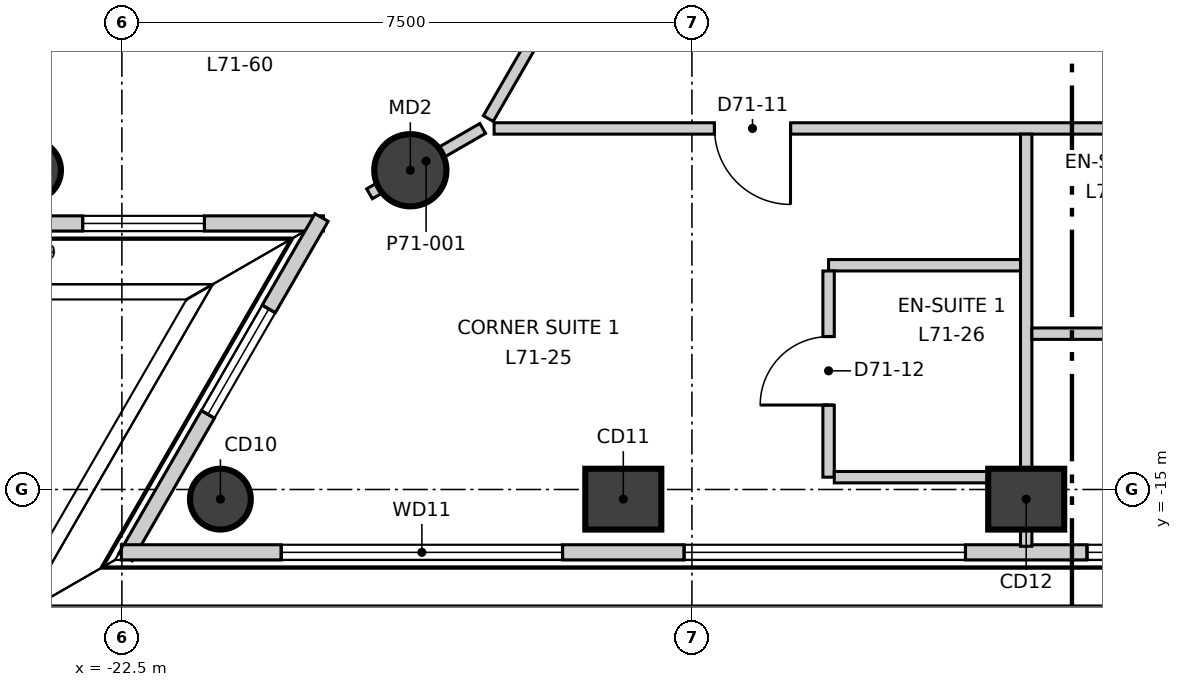
"""IFC4 building model, lengths in metres.
Left out: names, types, materials, properties, quantities, classifications, styles, units other than length and angle.
Written with IfcOpenShell. Run it as: python <this file> out.ifc"""

import sys

from ifc_helpers import new_model, si_unit, direction, frame, frame_2d, origin, origin_2d, place, context, subcontext, project, spatial, rectangle, circle, extrude, element, fill, save


model = new_model("IFC4")
c1 = context("Model", 3, precision=1e-05, world=origin(), true_north=direction((0.0, 1.0)))
c2 = subcontext(c1, "Body", "Model", "MODEL_VIEW")
j1 = project(units=[si_unit("LENGTHUNIT", "METRE"), si_unit("PLANEANGLEUNIT", "RADIAN")], contexts=[c1])
p1 = place(None, origin())
s1 = spatial("IfcSite", under=j1, at=p1, CompositionType="ELEMENT")
p2 = place(p1, origin())
s2 = spatial("IfcBuilding", under=s1, at=p2, CompositionType="ELEMENT")
p3 = place(p2, frame((0.0, 0.0, 300.7)))
s3 = spatial("IfcBuildingStorey", under=s2, at=p3, CompositionType="ELEMENT", Elevation=300.7)
for number, where, z_axis, x_axis in (
    (1, (-23.702, -10.8, -0.3), (0.0, 0.0, 1.0), (0.5, 0.866, 0.0)),
    (2, (-21.204, -15.127, -0.3), (0.0, 0.0, 1.0), (1.0, 0.0, 0.0)),
):
    element("IfcColumn", number, at=place(p3, frame(where, z_axis=z_axis, x_axis=x_axis)), inside=s3, PredefinedType="COLUMN", context=c2, shape_type="SweptSolid", body=[
        extrude(circle(Radius=0.4, at=origin_2d()), origin(), (0.0, 0.0, 1.0), 3.6),
    ])
for number, where, z_axis, x_axis in (
    (3, (-15.903, -15.127, -0.3), (0.0, 0.0, 1.0), (1.0, 0.0, 0.0)),
    (4, (-10.602, -15.127, -0.3), (0.0, 0.0, 1.0), (1.0, 0.0, 0.0)),
):
    element("IfcColumn", number, at=place(p3, frame(where, z_axis=z_axis, x_axis=x_axis)), inside=s3, PredefinedType="COLUMN", context=c2, shape_type="SweptSolid", body=[
        extrude(rectangle(XDim=1.0, YDim=0.8, at=origin_2d()), origin(), (0.0, 0.0, 1.0), 3.6),
    ])
p4 = place(p3, frame((-18.705, -10.8, -0.3), z_axis=(0.0, 0.0, 1.0), x_axis=(1.0, 0.0, 0.0)))
e5 = element("IfcColumn", 5, at=p4, inside=s3, PredefinedType="COLUMN", context=c2, shape_type="SweptSolid", body=[
    extrude(circle(Radius=0.475, at=origin_2d()), origin(), (0.0, 0.0, 1.0), 3.6),
])
p5 = place(p3, frame((-2.453, 27.405, 0.0), z_axis=(0.0, 0.0, 1.0), x_axis=(-0.500000041859, -0.866025379617, 0.0)))
e6 = element("IfcWall", 6, at=p5, inside=s3, PredefinedType="ELEMENTEDWALL", context=c2, shape_type="SweptSolid", body=[
    extrude(rectangle(XDim=44.994, YDim=0.2, at=frame_2d((22.497, 0.0))), origin(), (0.0, 0.0, 1.0), 3.3),
])
p6 = place(p5, frame((2.103, 0.0, 0.9)))
e7 = element("IfcOpeningElement", 7, at=p6, cuts=e6, PredefinedType="OPENING", context=c2, shape_type="SweptSolid", body=[
    extrude(rectangle(XDim=3.7, YDim=2.2, at=frame_2d((1.85, 1.1))), frame((0.0, 0.11, 0.0), z_axis=(0.0, -1.0, 0.0), x_axis=(1.0, 0.0, 0.0)), (0.0, 0.0, 1.0), 0.22),
])
p7 = place(p5, frame((7.404, 0.0, 0.9)))
e8 = element("IfcOpeningElement", 8, at=p7, cuts=e6, PredefinedType="OPENING", context=c2, shape_type="SweptSolid", body=[
    extrude(rectangle(XDim=3.7, YDim=2.2, at=frame_2d((1.85, 1.1))), frame((0.0, 0.11, 0.0), z_axis=(0.0, -1.0, 0.0), x_axis=(1.0, 0.0, 0.0)), (0.0, 0.0, 1.0), 0.22),
])
p8 = place(p5, frame((12.705, 0.0, 0.9)))
e9 = element("IfcOpeningElement", 9, at=p8, cuts=e6, PredefinedType="OPENING", context=c2, shape_type="SweptSolid", body=[
    extrude(rectangle(XDim=3.7, YDim=2.2, at=frame_2d((1.85, 1.1))), frame((0.0, 0.11, 0.0), z_axis=(0.0, -1.0, 0.0), x_axis=(1.0, 0.0, 0.0)), (0.0, 0.0, 1.0), 0.22),
])
p9 = place(p5, frame((18.006, 0.0, 0.9)))
e10 = element("IfcOpeningElement", 10, at=p9, cuts=e6, PredefinedType="OPENING", context=c2, shape_type="SweptSolid", body=[
    extrude(rectangle(XDim=3.7, YDim=2.2, at=frame_2d((1.85, 1.1))), frame((0.0, 0.11, 0.0), z_axis=(0.0, -1.0, 0.0), x_axis=(1.0, 0.0, 0.0)), (0.0, 0.0, 1.0), 0.22),
])
p10 = place(p5, frame((23.307, 0.0, 0.9)))
e11 = element("IfcOpeningElement", 11, at=p10, cuts=e6, PredefinedType="OPENING", context=c2, shape_type="SweptSolid", body=[
    extrude(rectangle(XDim=3.7, YDim=2.2, at=frame_2d((1.85, 1.1))), frame((0.0, 0.11, 0.0), z_axis=(0.0, -1.0, 0.0), x_axis=(1.0, 0.0, 0.0)), (0.0, 0.0, 1.0), 0.22),
])
p11 = place(p5, frame((28.608, 0.0, 0.9)))
e12 = element("IfcOpeningElement", 12, at=p11, cuts=e6, PredefinedType="OPENING", context=c2, shape_type="SweptSolid", body=[
    extrude(rectangle(XDim=3.7, YDim=2.2, at=frame_2d((1.85, 1.1))), frame((0.0, 0.11, 0.0), z_axis=(0.0, -1.0, 0.0), x_axis=(1.0, 0.0, 0.0)), (0.0, 0.0, 1.0), 0.22),
])
p12 = place(p5, frame((33.909, 0.0, 0.9)))
e13 = element("IfcOpeningElement", 13, at=p12, cuts=e6, PredefinedType="OPENING", context=c2, shape_type="SweptSolid", body=[
    extrude(rectangle(XDim=3.7, YDim=2.2, at=frame_2d((1.85, 1.1))), frame((0.0, 0.11, 0.0), z_axis=(0.0, -1.0, 0.0), x_axis=(1.0, 0.0, 0.0)), (0.0, 0.0, 1.0), 0.22),
])
p13 = place(p5, frame((39.21, 0.0, 0.9)))
e14 = element("IfcOpeningElement", 14, at=p13, cuts=e6, PredefinedType="OPENING", context=c2, shape_type="SweptSolid", body=[
    extrude(rectangle(XDim=3.7, YDim=2.2, at=frame_2d((1.85, 1.1))), frame((0.0, 0.11, 0.0), z_axis=(0.0, -1.0, 0.0), x_axis=(1.0, 0.0, 0.0)), (0.0, 0.0, 1.0), 0.22),
])
p14 = place(p3, frame((-25.005, -11.5, 0.0), z_axis=(0.0, 0.0, 1.0), x_axis=(1.0, 0.0, 0.0)))
e15 = element("IfcWall", 15, at=p14, inside=s3, PredefinedType="ELEMENTEDWALL", context=c2, shape_type="SweptSolid", body=[
    extrude(rectangle(XDim=5.157, YDim=0.2, at=frame_2d((2.579, 0.0))), origin(), (0.0, 0.0, 1.0), 3.3),
])
p15 = place(p14, frame((1.99, 0.0, 0.9)))
e16 = element("IfcOpeningElement", 16, at=p15, cuts=e15, PredefinedType="OPENING", context=c2, shape_type="SweptSolid", body=[
    extrude(rectangle(XDim=1.6, YDim=2.2, at=frame_2d((0.8, 1.1))), frame((0.0, 0.11, 0.0), z_axis=(0.0, -1.0, 0.0), x_axis=(1.0, 0.0, 0.0)), (0.0, 0.0, 1.0), 0.22),
])
p16 = place(p3, frame((-19.873, -11.422, 0.0), z_axis=(0.0, 0.0, 1.0), x_axis=(-0.500074877135, -0.865982169134, 0.0)))
e17 = element("IfcWall", 17, at=p16, inside=s3, PredefinedType="ELEMENTEDWALL", context=c2, shape_type="SweptSolid", body=[
    extrude(rectangle(XDim=5.157, YDim=0.2, at=frame_2d((2.579, 0.0))), origin(), (0.0, 0.0, 1.0), 3.3),
])
p17 = place(p16, frame((1.39, 0.0, 0.9)))
e18 = element("IfcOpeningElement", 18, at=p17, cuts=e17, PredefinedType="OPENING", context=c2, shape_type="SweptSolid", body=[
    extrude(rectangle(XDim=1.6, YDim=2.2, at=frame_2d((0.8, 1.1))), frame((0.0, 0.11, 0.0), z_axis=(0.0, -1.0, 0.0), x_axis=(1.0, 0.0, 0.0)), (0.0, 0.0, 1.0), 0.22),
])
p18 = place(p3, frame((-22.507, -15.827, 0.0), z_axis=(0.0, 0.0, 1.0), x_axis=(1.0, 0.0, 0.0)))
e19 = element("IfcWall", 19, at=p18, inside=s3, PredefinedType="ELEMENTEDWALL", context=c2, shape_type="SweptSolid", body=[
    extrude(rectangle(XDim=44.994, YDim=0.2, at=frame_2d((22.497, 0.0))), origin(), (0.0, 0.0, 1.0), 3.3),
])
p19 = place(p18, frame((2.104, 0.0, 0.9)))
e20 = element("IfcOpeningElement", 20, at=p19, cuts=e19, PredefinedType="OPENING", context=c2, shape_type="SweptSolid", body=[
    extrude(rectangle(XDim=3.7, YDim=2.2, at=frame_2d((1.85, 1.1))), frame((0.0, 0.11, 0.0), z_axis=(0.0, -1.0, 0.0), x_axis=(1.0, 0.0, 0.0)), (0.0, 0.0, 1.0), 0.22),
])
p20 = place(p18, frame((7.405, 0.0, 0.9)))
e21 = element("IfcOpeningElement", 21, at=p20, cuts=e19, PredefinedType="OPENING", context=c2, shape_type="SweptSolid", body=[
    extrude(rectangle(XDim=3.7, YDim=2.2, at=frame_2d((1.85, 1.1))), frame((0.0, 0.11, 0.0), z_axis=(0.0, -1.0, 0.0), x_axis=(1.0, 0.0, 0.0)), (0.0, 0.0, 1.0), 0.22),
])
p21 = place(p18, frame((12.706, 0.0, 0.9)))
e22 = element("IfcOpeningElement", 22, at=p21, cuts=e19, PredefinedType="OPENING", context=c2, shape_type="SweptSolid", body=[
    extrude(rectangle(XDim=3.7, YDim=2.2, at=frame_2d((1.85, 1.1))), frame((0.0, 0.11, 0.0), z_axis=(0.0, -1.0, 0.0), x_axis=(1.0, 0.0, 0.0)), (0.0, 0.0, 1.0), 0.22),
])
p22 = place(p18, frame((18.006, 0.0, 0.9)))
e23 = element("IfcOpeningElement", 23, at=p22, cuts=e19, PredefinedType="OPENING", context=c2, shape_type="SweptSolid", body=[
    extrude(rectangle(XDim=3.7, YDim=2.2, at=frame_2d((1.85, 1.1))), frame((0.0, 0.11, 0.0), z_axis=(0.0, -1.0, 0.0), x_axis=(1.0, 0.0, 0.0)), (0.0, 0.0, 1.0), 0.22),
])
p23 = place(p18, frame((23.308, 0.0, 0.9)))
e24 = element("IfcOpeningElement", 24, at=p23, cuts=e19, PredefinedType="OPENING", context=c2, shape_type="SweptSolid", body=[
    extrude(rectangle(XDim=3.7, YDim=2.2, at=frame_2d((1.85, 1.1))), frame((0.0, 0.11, 0.0), z_axis=(0.0, -1.0, 0.0), x_axis=(1.0, 0.0, 0.0)), (0.0, 0.0, 1.0), 0.22),
])
p24 = place(p18, frame((28.608, 0.0, 0.9)))
e25 = element("IfcOpeningElement", 25, at=p24, cuts=e19, PredefinedType="OPENING", context=c2, shape_type="SweptSolid", body=[
    extrude(rectangle(XDim=3.7, YDim=2.2, at=frame_2d((1.85, 1.1))), frame((0.0, 0.11, 0.0), z_axis=(0.0, -1.0, 0.0), x_axis=(1.0, 0.0, 0.0)), (0.0, 0.0, 1.0), 0.22),
])
p25 = place(p18, frame((33.91, 0.0, 0.9)))
e26 = element("IfcOpeningElement", 26, at=p25, cuts=e19, PredefinedType="OPENING", context=c2, shape_type="SweptSolid", body=[
    extrude(rectangle(XDim=3.7, YDim=2.2, at=frame_2d((1.85, 1.1))), frame((0.0, 0.11, 0.0), z_axis=(0.0, -1.0, 0.0), x_axis=(1.0, 0.0, 0.0)), (0.0, 0.0, 1.0), 0.22),
])
p26 = place(p18, frame((39.21, 0.0, 0.9)))
e27 = element("IfcOpeningElement", 27, at=p26, cuts=e19, PredefinedType="OPENING", context=c2, shape_type="SweptSolid", body=[
    extrude(rectangle(XDim=3.7, YDim=2.2, at=frame_2d((1.85, 1.1))), frame((0.0, 0.11, 0.0), z_axis=(0.0, -1.0, 0.0), x_axis=(1.0, 0.0, 0.0)), (0.0, 0.0, 1.0), 0.22),
])
p27 = place(p3, frame((-19.242, -11.11, 0.0), z_axis=(0.0, 0.0, 1.0), x_axis=(0.86591836888, 0.500185344083, 0.0)))
e28 = element("IfcWall", 28, at=p27, inside=s3, PredefinedType="PARTITIONING", context=c2, shape_type="SweptSolid", body=[
    extrude(rectangle(XDim=1.719, YDim=0.15, at=frame_2d((0.86, 0.0))), origin(), (0.0, 0.0, 1.0), 2.8),
])
p28 = place(p3, frame((-17.603, -10.25, 0.0), z_axis=(0.0, 0.0, 1.0), x_axis=(1.0, 0.0, 0.0)))
e29 = element("IfcWall", 29, at=p28, inside=s3, PredefinedType="PARTITIONING", context=c2, shape_type="SweptSolid", body=[
    extrude(rectangle(XDim=35.356, YDim=0.15, at=frame_2d((17.678, 0.0))), origin(), (0.0, 0.0, 1.0), 3.3),
])
p29 = place(p28, frame((2.9, 0.0, 0.0)))
e30 = element("IfcOpeningElement", 30, at=p29, cuts=e29, PredefinedType="OPENING", context=c2, shape_type="SweptSolid", body=[
    extrude(rectangle(XDim=1.0, YDim=2.1, at=frame_2d((0.5, 1.05))), frame((0.0, 0.085, 0.0), z_axis=(0.0, -1.0, 0.0), x_axis=(1.0, 0.0, 0.0)), (0.0, 0.0, 1.0), 0.17),
])
p30 = place(p28, frame((10.351, 0.0, 0.0)))
e31 = element("IfcOpeningElement", 31, at=p30, cuts=e29, PredefinedType="OPENING", context=c2, shape_type="SweptSolid", body=[
    extrude(rectangle(XDim=1.0, YDim=2.1, at=frame_2d((0.5, 1.05))), frame((0.0, 0.085, 0.0), z_axis=(0.0, -1.0, 0.0), x_axis=(1.0, 0.0, 0.0)), (0.0, 0.0, 1.0), 0.17),
])
p31 = place(p28, frame((15.652, 0.0, 0.0)))
e32 = element("IfcOpeningElement", 32, at=p31, cuts=e29, PredefinedType="OPENING", context=c2, shape_type="SweptSolid", body=[
    extrude(rectangle(XDim=1.0, YDim=2.1, at=frame_2d((0.5, 1.05))), frame((0.0, 0.085, 0.0), z_axis=(0.0, -1.0, 0.0), x_axis=(1.0, 0.0, 0.0)), (0.0, 0.0, 1.0), 0.17),
])
p32 = place(p28, frame((24.753, 0.0, 0.0)))
e33 = element("IfcOpeningElement", 33, at=p32, cuts=e29, PredefinedType="OPENING", context=c2, shape_type="SweptSolid", body=[
    extrude(rectangle(XDim=1.0, YDim=2.1, at=frame_2d((0.5, 1.05))), frame((0.0, 0.085, 0.0), z_axis=(0.0, -1.0, 0.0), x_axis=(1.0, 0.0, 0.0)), (0.0, 0.0, 1.0), 0.17),
])
p33 = place(p28, frame((31.255, 0.0, 0.0)))
e34 = element("IfcOpeningElement", 34, at=p33, cuts=e29, PredefinedType="OPENING", context=c2, shape_type="SweptSolid", body=[
    extrude(rectangle(XDim=1.0, YDim=2.1, at=frame_2d((0.5, 1.05))), frame((0.0, 0.085, 0.0), z_axis=(0.0, -1.0, 0.0), x_axis=(1.0, 0.0, 0.0)), (0.0, 0.0, 1.0), 0.17),
])
p34 = place(p3, frame((-17.679, -10.12, 0.0), z_axis=(0.0, 0.0, 1.0), x_axis=(0.500008955215, 0.866020233427, 0.0)))
e35 = element("IfcWall", 35, at=p34, inside=s3, PredefinedType="PARTITIONING", context=c2, shape_type="SweptSolid", body=[
    extrude(rectangle(XDim=35.357, YDim=0.15, at=frame_2d((17.679, 0.0))), origin(), (0.0, 0.0, 1.0), 3.3),
])
p35 = place(p34, frame((31.307, 0.0, 0.0)))
e36 = element("IfcOpeningElement", 36, at=p35, cuts=e35, PredefinedType="OPENING", context=c2, shape_type="SweptSolid", body=[
    extrude(rectangle(XDim=1.0, YDim=2.1, at=frame_2d((0.5, 1.05))), frame((0.0, 0.085, 0.0), z_axis=(0.0, -1.0, 0.0), x_axis=(1.0, 0.0, 0.0)), (0.0, 0.0, 1.0), 0.17),
])
p36 = place(p34, frame((20.056, 0.0, 0.0)))
e37 = element("IfcOpeningElement", 37, at=p36, cuts=e35, PredefinedType="OPENING", context=c2, shape_type="SweptSolid", body=[
    extrude(rectangle(XDim=1.0, YDim=2.1, at=frame_2d((0.5, 1.05))), frame((0.0, 0.085, 0.0), z_axis=(0.0, -1.0, 0.0), x_axis=(1.0, 0.0, 0.0)), (0.0, 0.0, 1.0), 0.17),
])
p37 = place(p34, frame((13.253, 0.0, 0.0)))
e38 = element("IfcOpeningElement", 38, at=p37, cuts=e35, PredefinedType="OPENING", context=c2, shape_type="SweptSolid", body=[
    extrude(rectangle(XDim=1.0, YDim=2.1, at=frame_2d((0.5, 1.05))), frame((0.0, 0.085, 0.0), z_axis=(0.0, -1.0, 0.0), x_axis=(1.0, 0.0, 0.0)), (0.0, 0.0, 1.0), 0.17),
])
p38 = place(p34, frame((7.653, 0.0, 0.0)))
e39 = element("IfcOpeningElement", 39, at=p38, cuts=e35, PredefinedType="OPENING", context=c2, shape_type="SweptSolid", body=[
    extrude(rectangle(XDim=1.0, YDim=2.1, at=frame_2d((0.5, 1.05))), frame((0.0, 0.085, 0.0), z_axis=(0.0, -1.0, 0.0), x_axis=(1.0, 0.0, 0.0)), (0.0, 0.0, 1.0), 0.17),
])
p39 = place(p34, frame((2.952, 0.0, 0.0)))
e40 = element("IfcOpeningElement", 40, at=p39, cuts=e35, PredefinedType="OPENING", context=c2, shape_type="SweptSolid", body=[
    extrude(rectangle(XDim=1.0, YDim=2.1, at=frame_2d((0.5, 1.05))), frame((0.0, 0.085, 0.0), z_axis=(0.0, -1.0, 0.0), x_axis=(1.0, 0.0, 0.0)), (0.0, 0.0, 1.0), 0.17),
])
p40 = place(p3, frame((-10.602, -15.747, 0.0), z_axis=(0.0, 0.0, 1.0), x_axis=(0.0, 1.0, 0.0)))
e41 = element("IfcWall", 41, at=p40, inside=s3, PredefinedType="PARTITIONING", context=c2, shape_type="SweptSolid", body=[
    extrude(rectangle(XDim=5.422, YDim=0.15, at=frame_2d((2.711, 0.0))), origin(), (0.0, 0.0, 1.0), 3.3),
])
p41 = place(p3, frame((-10.527, -12.95, 0.0), z_axis=(0.0, 0.0, 1.0), x_axis=(1.0, 0.0, 0.0)))
e42 = element("IfcWall", 42, at=p41, inside=s3, PredefinedType="PARTITIONING", context=c2, shape_type="SweptSolid", body=[
    extrude(rectangle(XDim=2.225, YDim=0.15, at=frame_2d((1.113, 0.0))), origin(), (0.0, 0.0, 1.0), 3.3),
])
p42 = place(p3, frame((-13.202, -12.05, 0.0), z_axis=(0.0, 0.0, 1.0), x_axis=(1.0, 0.0, 0.0)))
e43 = element("IfcWall", 43, at=p42, inside=s3, PredefinedType="PARTITIONING", context=c2, shape_type="SweptSolid", body=[
    extrude(rectangle(XDim=2.525, YDim=0.15, at=frame_2d((1.262, 0.0))), origin(), (0.0, 0.0, 1.0), 3.3),
])
p43 = place(p3, frame((-13.202, -14.838, 0.0), z_axis=(0.0, 0.0, 1.0), x_axis=(0.0, 1.0, 0.0)))
e44 = element("IfcWall", 44, at=p43, inside=s3, PredefinedType="PARTITIONING", context=c2, shape_type="SweptSolid", body=[
    extrude(rectangle(XDim=2.713, YDim=0.15, at=frame_2d((1.356, 0.0))), origin(), (0.0, 0.0, 1.0), 3.3),
])
p44 = place(p43, frame((0.949, 0.0, 0.0)))
e45 = element("IfcOpeningElement", 45, at=p44, cuts=e44, PredefinedType="OPENING", context=c2, shape_type="SweptSolid", body=[
    extrude(rectangle(XDim=0.9, YDim=2.1, at=frame_2d((0.45, 1.05))), frame((0.0, 0.085, 0.0), z_axis=(0.0, -1.0, 0.0), x_axis=(1.0, 0.0, 0.0)), (0.0, 0.0, 1.0), 0.17),
])
p45 = place(p3, frame((-13.127, -14.838, 0.0), z_axis=(0.0, 0.0, 1.0), x_axis=(1.0, 0.0, 0.0)))
e46 = element("IfcWall", 46, at=p45, inside=s3, PredefinedType="PARTITIONING", context=c2, shape_type="SweptSolid", body=[
    extrude(rectangle(XDim=2.45, YDim=0.15, at=frame_2d((1.225, 0.0))), origin(), (0.0, 0.0, 1.0), 2.6),
])
p46 = place(p13, origin())
e47 = element("IfcWindow", 47, at=p46, inside=s3, PartitioningType="SINGLE_PANEL", PredefinedType="WINDOW", context=c2, shape_type="SweptSolid", body=[
    extrude(rectangle(XDim=3.7, YDim=2.2, at=frame_2d((1.85, 1.1))), frame((0.0, 0.03, 0.0), z_axis=(0.0, -1.0, 0.0), x_axis=(1.0, 0.0, 0.0)), (0.0, 0.0, 1.0), 0.06),
])
fill(e14, e47)
p47 = place(p15, origin())
e48 = element("IfcWindow", 48, at=p47, inside=s3, PartitioningType="SINGLE_PANEL", PredefinedType="WINDOW", context=c2, shape_type="SweptSolid", body=[
    extrude(rectangle(XDim=1.6, YDim=2.2, at=frame_2d((0.8, 1.1))), frame((0.0, 0.03, 0.0), z_axis=(0.0, -1.0, 0.0), x_axis=(1.0, 0.0, 0.0)), (0.0, 0.0, 1.0), 0.06),
])
fill(e16, e48)
p48 = place(p17, origin())
e49 = element("IfcWindow", 49, at=p48, inside=s3, PartitioningType="SINGLE_PANEL", PredefinedType="WINDOW", context=c2, shape_type="SweptSolid", body=[
    extrude(rectangle(XDim=1.6, YDim=2.2, at=frame_2d((0.8, 1.1))), frame((0.0, 0.03, 0.0), z_axis=(0.0, -1.0, 0.0), x_axis=(1.0, 0.0, 0.0)), (0.0, 0.0, 1.0), 0.06),
])
fill(e18, e49)
p49 = place(p19, origin())
e50 = element("IfcWindow", 50, at=p49, inside=s3, PartitioningType="SINGLE_PANEL", PredefinedType="WINDOW", context=c2, shape_type="SweptSolid", body=[
    extrude(rectangle(XDim=3.7, YDim=2.2, at=frame_2d((1.85, 1.1))), frame((0.0, 0.03, 0.0), z_axis=(0.0, -1.0, 0.0), x_axis=(1.0, 0.0, 0.0)), (0.0, 0.0, 1.0), 0.06),
])
fill(e20, e50)
p50 = place(p20, origin())
e51 = element("IfcWindow", 51, at=p50, inside=s3, PartitioningType="SINGLE_PANEL", PredefinedType="WINDOW", context=c2, shape_type="SweptSolid", body=[
    extrude(rectangle(XDim=3.7, YDim=2.2, at=frame_2d((1.85, 1.1))), frame((0.0, 0.03, 0.0), z_axis=(0.0, -1.0, 0.0), x_axis=(1.0, 0.0, 0.0)), (0.0, 0.0, 1.0), 0.06),
])
fill(e21, e51)
p51 = place(p21, origin())
e52 = element("IfcWindow", 52, at=p51, inside=s3, PartitioningType="SINGLE_PANEL", PredefinedType="WINDOW", context=c2, shape_type="SweptSolid", body=[
    extrude(rectangle(XDim=3.7, YDim=2.2, at=frame_2d((1.85, 1.1))), frame((0.0, 0.03, 0.0), z_axis=(0.0, -1.0, 0.0), x_axis=(1.0, 0.0, 0.0)), (0.0, 0.0, 1.0), 0.06),
])
fill(e22, e52)
p52 = place(p29, origin())
e53 = element("IfcDoor", 53, at=p52, inside=s3, OperationType="SINGLE_SWING_RIGHT", PredefinedType="DOOR", context=c2, shape_type="SweptSolid", body=[
    extrude(rectangle(XDim=1.0, YDim=2.1, at=frame_2d((0.5, 1.05))), frame((0.0, 0.025, 0.0), z_axis=(0.0, -1.0, 0.0), x_axis=(1.0, 0.0, 0.0)), (0.0, 0.0, 1.0), 0.05),
])
fill(e30, e53)
p53 = place(p44, origin())
e54 = element("IfcDoor", 54, at=p53, inside=s3, OperationType="SINGLE_SWING_RIGHT", PredefinedType="DOOR", context=c2, shape_type="SweptSolid", body=[
    extrude(rectangle(XDim=0.9, YDim=2.1, at=frame_2d((0.45, 1.05))), frame((0.0, 0.025, 0.0), z_axis=(0.0, -1.0, 0.0), x_axis=(1.0, 0.0, 0.0)), (0.0, 0.0, 1.0), 0.05),
])
fill(e45, e54)
save(model, sys.argv[1])
